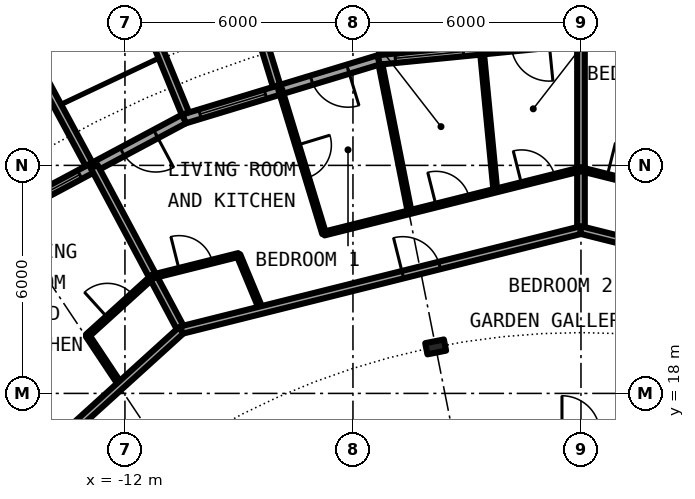
"""IFC4 building model, lengths in metres.
Left out: names, types, materials, properties, quantities, classifications, styles, units other than length and angle.
Written with IfcOpenShell. Run it as: python <this file> out.ifc"""

import sys

from ifc_helpers import new_model, si_unit, direction, frame, frame_2d, origin, origin_2d, place, context, subcontext, project, spatial, rectangle, i_section, extrude, element, fill, save


model = new_model("IFC4")
c1 = context("Model", 3, precision=1e-05, world=origin(), true_north=direction((0.0, 1.0)))
c2 = subcontext(c1, "Body", "Model", "MODEL_VIEW")
j1 = project(units=[si_unit("LENGTHUNIT", "METRE"), si_unit("PLANEANGLEUNIT", "RADIAN")], contexts=[c1])
p1 = place(None, origin())
s1 = spatial("IfcSite", under=j1, at=p1, CompositionType="ELEMENT")
p2 = place(p1, origin())
s2 = spatial("IfcBuilding", under=s1, at=p2, CompositionType="ELEMENT")
p3 = place(p2, frame((0.0, 0.0, 154.35)))
s3 = spatial("IfcBuildingStorey", under=s2, at=p3, CompositionType="ELEMENT", Elevation=154.35)
p4 = place(p3, frame((-3.824, 19.223, 0.0), z_axis=(0.0, 0.0, 1.0), x_axis=(-0.195090322016, 0.980785280403, 0.0)))
e1 = element("IfcColumn", 1, at=p4, inside=s3, PredefinedType="COLUMN", context=c2, shape_type="SweptSolid", body=[
    extrude(i_section(OverallWidth=0.3, OverallDepth=0.5, WebThickness=0.014, FlangeThickness=0.028, FilletRadius=0.027, at=origin_2d()), origin(), (0.0, 0.0, 1.0), 3.05),
])
p5 = place(p3, frame((5.326, 26.775, 0.0), z_axis=(0.0, 0.0, 1.0), x_axis=(-0.995173996315, 0.098126026407, 0.0)))
e2 = element("IfcWall", 2, at=p5, inside=s3, PredefinedType="SOLIDWALL", context=c2, shape_type="SweptSolid", body=[
    extrude(rectangle(XDim=5.352, YDim=0.25, at=frame_2d((2.676, 0.0))), origin(), (0.0, 0.0, 1.0), 2.7),
])
p6 = place(p5, frame((0.841, 0.0, 0.0)))
e3 = element("IfcOpeningElement", 3, at=p6, cuts=e2, PredefinedType="OPENING", context=c2, shape_type="SweptSolid", body=[
    extrude(rectangle(XDim=1.0, YDim=2.2, at=frame_2d((0.5, 1.1))), frame((0.0, 0.135, 0.0), z_axis=(0.0, -1.0, 0.0), x_axis=(1.0, 0.0, 0.0)), (0.0, 0.0, 1.0), 0.27),
])
p7 = place(p5, frame((3.111, 0.0, 0.3)))
e4 = element("IfcOpeningElement", 4, at=p7, cuts=e2, PredefinedType="OPENING", context=c2, shape_type="SweptSolid", body=[
    extrude(rectangle(XDim=1.8, YDim=2.1, at=frame_2d((0.9, 1.05))), frame((0.0, 0.135, 0.0), z_axis=(0.0, -1.0, 0.0), x_axis=(1.0, 0.0, 0.0)), (0.0, 0.0, 1.0), 0.27),
])
p8 = place(p3, frame((0.0, 27.3, 0.0), z_axis=(0.0, 0.0, 1.0), x_axis=(-0.995173996315, -0.098126026407, 0.0)))
e5 = element("IfcWall", 5, at=p8, inside=s3, PredefinedType="SOLIDWALL", context=c2, shape_type="SweptSolid", body=[
    extrude(rectangle(XDim=5.352, YDim=0.25, at=frame_2d((2.676, 0.0))), origin(), (0.0, 0.0, 1.0), 2.7),
])
p9 = place(p8, frame((0.841, 0.0, 0.0)))
e6 = element("IfcOpeningElement", 6, at=p9, cuts=e5, PredefinedType="OPENING", context=c2, shape_type="SweptSolid", body=[
    extrude(rectangle(XDim=1.0, YDim=2.2, at=frame_2d((0.5, 1.1))), frame((0.0, 0.135, 0.0), z_axis=(0.0, -1.0, 0.0), x_axis=(1.0, 0.0, 0.0)), (0.0, 0.0, 1.0), 0.27),
])
p10 = place(p8, frame((3.111, 0.0, 0.3)))
e7 = element("IfcOpeningElement", 7, at=p10, cuts=e5, PredefinedType="OPENING", context=c2, shape_type="SweptSolid", body=[
    extrude(rectangle(XDim=1.8, YDim=2.1, at=frame_2d((0.9, 1.05))), frame((0.0, 0.135, 0.0), z_axis=(0.0, -1.0, 0.0), x_axis=(1.0, 0.0, 0.0)), (0.0, 0.0, 1.0), 0.27),
])
p11 = place(p3, frame((-4.769, 26.956, -0.03), z_axis=(0.0, 0.0, 1.0), x_axis=(-0.174056778901, 0.984735618183, 0.0)))
e8 = element("IfcWall", 8, at=p11, inside=s3, PredefinedType="SOLIDWALL", context=c2, shape_type="SweptSolid", body=[
    extrude(rectangle(XDim=2.925, YDim=0.2, at=frame_2d((1.462, 0.0))), origin(), (0.0, 0.0, 1.0), 2.73),
])
p12 = place(p3, frame((-5.326, 26.775, 0.0), z_axis=(0.0, 0.0, 1.0), x_axis=(-0.956965678721, -0.290201119486, 0.0)))
e9 = element("IfcWall", 9, at=p12, inside=s3, PredefinedType="SOLIDWALL", context=c2, shape_type="SweptSolid", body=[
    extrude(rectangle(XDim=5.351, YDim=0.25, at=frame_2d((2.676, 0.0))), origin(), (0.0, 0.0, 1.0), 2.7),
])
p13 = place(p12, frame((0.841, 0.0, 0.0)))
e10 = element("IfcOpeningElement", 10, at=p13, cuts=e9, PredefinedType="OPENING", context=c2, shape_type="SweptSolid", body=[
    extrude(rectangle(XDim=1.0, YDim=2.2, at=frame_2d((0.5, 1.1))), frame((0.0, 0.135, 0.0), z_axis=(0.0, -1.0, 0.0), x_axis=(1.0, 0.0, 0.0)), (0.0, 0.0, 1.0), 0.27),
])
p14 = place(p12, frame((3.111, 0.0, 0.3)))
e11 = element("IfcOpeningElement", 11, at=p14, cuts=e9, PredefinedType="OPENING", context=c2, shape_type="SweptSolid", body=[
    extrude(rectangle(XDim=1.8, YDim=2.1, at=frame_2d((0.9, 1.05))), frame((0.0, 0.135, 0.0), z_axis=(0.0, -1.0, 0.0), x_axis=(1.0, 0.0, 0.0)), (0.0, 0.0, 1.0), 0.27),
])
p15 = place(p3, frame((-8.009, 26.092, -0.03), z_axis=(0.0, 0.0, 1.0), x_axis=(-0.293406695073, 0.955987715029, 0.0)))
e12 = element("IfcWall", 12, at=p15, inside=s3, PredefinedType="SOLIDWALL", context=c2, shape_type="SweptSolid", body=[
    extrude(rectangle(XDim=3.006, YDim=0.2, at=frame_2d((1.503, 0.0))), origin(), (0.0, 0.0, 1.0), 2.73),
])
p16 = place(p3, frame((-10.409, 25.364, -0.03), z_axis=(0.0, 0.0, 1.0), x_axis=(-0.379509886562, 0.925187681501, 0.0)))
e13 = element("IfcWall", 13, at=p16, inside=s3, PredefinedType="SOLIDWALL", context=c2, shape_type="SweptSolid", body=[
    extrude(rectangle(XDim=2.883, YDim=0.2, at=frame_2d((1.441, 0.0))), origin(), (0.0, 0.0, 1.0), 2.73),
])
p17 = place(p3, frame((-10.447, 25.222, 0.0), z_axis=(0.0, 0.0, 1.0), x_axis=(-0.881915646801, -0.471407246368, 0.0)))
e14 = element("IfcWall", 14, at=p17, inside=s3, PredefinedType="SOLIDWALL", context=c2, shape_type="SweptSolid", body=[
    extrude(rectangle(XDim=5.352, YDim=0.25, at=frame_2d((2.676, 0.0))), origin(), (0.0, 0.0, 1.0), 2.7),
])
p18 = place(p17, frame((0.841, 0.0, 0.0)))
e15 = element("IfcOpeningElement", 15, at=p18, cuts=e14, PredefinedType="OPENING", context=c2, shape_type="SweptSolid", body=[
    extrude(rectangle(XDim=1.0, YDim=2.2, at=frame_2d((0.5, 1.1))), frame((0.0, 0.135, 0.0), z_axis=(0.0, -1.0, 0.0), x_axis=(1.0, 0.0, 0.0)), (0.0, 0.0, 1.0), 0.27),
])
p19 = place(p17, frame((3.111, 0.0, 0.3)))
e16 = element("IfcOpeningElement", 16, at=p19, cuts=e14, PredefinedType="OPENING", context=c2, shape_type="SweptSolid", body=[
    extrude(rectangle(XDim=1.8, YDim=2.1, at=frame_2d((0.9, 1.05))), frame((0.0, 0.135, 0.0), z_axis=(0.0, -1.0, 0.0), x_axis=(1.0, 0.0, 0.0)), (0.0, 0.0, 1.0), 0.27),
])
p20 = place(p3, frame((-12.945, 24.029, -0.03), z_axis=(0.0, 0.0, 1.0), x_axis=(-0.474424310775, 0.88029629861, 0.0)))
e17 = element("IfcWall", 17, at=p20, inside=s3, PredefinedType="SOLIDWALL", context=c2, shape_type="SweptSolid", body=[
    extrude(rectangle(XDim=3.006, YDim=0.2, at=frame_2d((1.503, 0.0))), origin(), (0.0, 0.0, 1.0), 2.73),
])
p21 = place(p3, frame((-12.984, 19.521, 0.0), z_axis=(0.0, 0.0, 1.0), x_axis=(0.55373148684, -0.832695286694, 0.0)))
e18 = element("IfcWall", 18, at=p21, inside=s3, PredefinedType="PARTITIONING", context=c2, shape_type="SweptSolid", body=[
    extrude(rectangle(XDim=1.571, YDim=0.1, at=frame_2d((0.786, 0.0))), origin(), (0.0, 0.0, 1.0), 2.7),
])
p22 = place(p3, frame((-9.013, 21.642, 0.0), z_axis=(0.0, 0.0, 1.0), x_axis=(0.384228756538, -0.923237923099, 0.0)))
e19 = element("IfcWall", 19, at=p22, inside=s3, PredefinedType="PARTITIONING", context=c2, shape_type="SweptSolid", body=[
    extrude(rectangle(XDim=1.569, YDim=0.1, at=frame_2d((0.785, 0.0))), origin(), (0.0, 0.0, 1.0), 2.7),
])
p23 = place(p3, frame((-12.809, 23.966, 0.0), z_axis=(0.0, 0.0, 1.0), x_axis=(0.471271812246, -0.881988026553, 0.0)))
e20 = element("IfcWall", 20, at=p23, inside=s3, PredefinedType="PARTITIONING", context=c2, shape_type="SweptSolid", body=[
    extrude(rectangle(XDim=4.874, YDim=0.2, at=frame_2d((2.437, 0.0))), origin(), (0.0, 0.0, 1.0), 2.7),
])
p24 = place(p3, frame((-7.914, 25.997, 0.0), z_axis=(0.0, 0.0, 1.0), x_axis=(0.291291575636, -0.956634317785, 0.0)))
e21 = element("IfcWall", 21, at=p24, inside=s3, PredefinedType="PARTITIONING", context=c2, shape_type="SweptSolid", body=[
    extrude(rectangle(XDim=3.962, YDim=0.1, at=frame_2d((1.981, 0.0))), origin(), (0.0, 0.0, 1.0), 2.7),
])
p25 = place(p24, frame((1.531, 0.0, 0.0)))
e22 = element("IfcOpeningElement", 22, at=p25, cuts=e21, PredefinedType="OPENING", context=c2, shape_type="SweptSolid", body=[
    extrude(rectangle(XDim=0.9, YDim=2.3, at=frame_2d((0.45, 1.15))), frame((0.0, 0.06, 0.0), z_axis=(0.0, -1.0, 0.0), x_axis=(1.0, 0.0, 0.0)), (0.0, 0.0, 1.0), 0.12),
])
p26 = place(p3, frame((-5.276, 26.658, 0.0), z_axis=(0.0, 0.0, 1.0), x_axis=(0.194030211642, -0.980995554001, 0.0)))
e23 = element("IfcWall", 23, at=p26, inside=s3, PredefinedType="PARTITIONING", context=c2, shape_type="SweptSolid", body=[
    extrude(rectangle(XDim=3.962, YDim=0.1, at=frame_2d((1.981, 0.0))), origin(), (0.0, 0.0, 1.0), 2.7),
])
p27 = place(p3, frame((-2.612, 27.049, 0.0), z_axis=(0.0, 0.0, 1.0), x_axis=(0.09626981452, -0.995355274669, 0.0)))
e24 = element("IfcWall", 24, at=p27, inside=s3, PredefinedType="PARTITIONING", context=c2, shape_type="SweptSolid", body=[
    extrude(rectangle(XDim=3.73, YDim=0.1, at=frame_2d((1.865, 0.0))), origin(), (0.0, 0.0, 1.0), 2.7),
])
p28 = place(p3, frame((0.0, 22.3, 0.0), z_axis=(0.0, 0.0, 1.0), x_axis=(0.0, 1.0, 0.0)))
e25 = element("IfcWall", 25, at=p28, inside=s3, PredefinedType="PARTITIONING", context=c2, shape_type="SweptSolid", body=[
    extrude(rectangle(XDim=4.875, YDim=0.2, at=frame_2d((2.438, 0.0))), origin(), (0.0, 0.0, 1.0), 2.7),
])
p29 = place(p3, frame((-18.544, 12.385, 0.0), z_axis=(0.0, 0.0, 1.0), x_axis=(0.740849323054, 0.67167125927, 0.0)))
e26 = element("IfcWall", 26, at=p29, inside=s3, PredefinedType="PARTITIONING", context=c2, shape_type="SweptSolid", body=[
    extrude(rectangle(XDim=10.842, YDim=0.2, at=frame_2d((5.421, 0.0))), origin(), (0.0, 0.0, 1.0), 2.7),
])
p30 = place(p29, frame((3.839, 0.0, 0.0)))
e27 = element("IfcOpeningElement", 27, at=p30, cuts=e26, PredefinedType="OPENING", context=c2, shape_type="SweptSolid", body=[
    extrude(rectangle(XDim=1.0, YDim=2.3, at=frame_2d((0.5, 1.15))), frame((0.0, 0.11, 0.0), z_axis=(0.0, -1.0, 0.0), x_axis=(1.0, 0.0, 0.0)), (0.0, 0.0, 1.0), 0.22),
])
p31 = place(p3, frame((-10.512, 19.667, 0.0), z_axis=(0.0, 0.0, 1.0), x_axis=(0.970086843848, 0.242758141765, 0.0)))
e28 = element("IfcWall", 28, at=p31, inside=s3, PredefinedType="PARTITIONING", context=c2, shape_type="SweptSolid", body=[
    extrude(rectangle(XDim=10.842, YDim=0.2, at=frame_2d((5.421, 0.0))), origin(), (0.0, 0.0, 1.0), 2.7),
])
p32 = place(p31, frame((6.002, 0.0, 0.0)))
e29 = element("IfcOpeningElement", 29, at=p32, cuts=e28, PredefinedType="OPENING", context=c2, shape_type="SweptSolid", body=[
    extrude(rectangle(XDim=1.0, YDim=2.3, at=frame_2d((0.5, 1.15))), frame((0.0, 0.11, 0.0), z_axis=(0.0, -1.0, 0.0), x_axis=(1.0, 0.0, 0.0)), (0.0, 0.0, 1.0), 0.22),
])
p33 = place(p3, frame((-0.006, 22.299, 0.0), z_axis=(0.0, 0.0, 1.0), x_axis=(0.970086843848, -0.242758141765, 0.0)))
e30 = element("IfcWall", 30, at=p33, inside=s3, PredefinedType="PARTITIONING", context=c2, shape_type="SweptSolid", body=[
    extrude(rectangle(XDim=10.842, YDim=0.2, at=frame_2d((5.421, 0.0))), origin(), (0.0, 0.0, 1.0), 2.7),
])
p34 = place(p33, frame((3.841, 0.0, 0.0)))
e31 = element("IfcOpeningElement", 31, at=p34, cuts=e30, PredefinedType="OPENING", context=c2, shape_type="SweptSolid", body=[
    extrude(rectangle(XDim=1.0, YDim=2.3, at=frame_2d((0.5, 1.15))), frame((0.0, 0.11, 0.0), z_axis=(0.0, -1.0, 0.0), x_axis=(1.0, 0.0, 0.0)), (0.0, 0.0, 1.0), 0.22),
])
p35 = place(p3, frame((-12.993, 19.513, 0.0), z_axis=(0.0, 0.0, 1.0), x_axis=(0.74087097024, 0.671647381783, 0.0)))
e32 = element("IfcWall", 32, at=p35, inside=s3, PredefinedType="PARTITIONING", context=c2, shape_type="SweptSolid", body=[
    extrude(rectangle(XDim=2.324, YDim=0.1, at=frame_2d((1.162, 0.0))), origin(), (0.0, 0.0, 1.0), 2.7),
])
p36 = place(p35, frame((0.719, 0.0, 0.0)))
e33 = element("IfcOpeningElement", 33, at=p36, cuts=e32, PredefinedType="OPENING", context=c2, shape_type="SweptSolid", body=[
    extrude(rectangle(XDim=0.9, YDim=2.3, at=frame_2d((0.45, 1.15))), frame((0.0, 0.06, 0.0), z_axis=(0.0, -1.0, 0.0), x_axis=(1.0, 0.0, 0.0)), (0.0, 0.0, 1.0), 0.12),
])
p37 = place(p3, frame((-11.266, 21.078, 0.0), z_axis=(0.0, 0.0, 1.0), x_axis=(0.970074595874, 0.242807080706, 0.0)))
e34 = element("IfcWall", 34, at=p37, inside=s3, PredefinedType="PARTITIONING", context=c2, shape_type="SweptSolid", body=[
    extrude(rectangle(XDim=2.328, YDim=0.1, at=frame_2d((1.164, 0.0))), origin(), (0.0, 0.0, 1.0), 2.7),
])
p38 = place(p37, frame((0.714, 0.0, 0.0)))
e35 = element("IfcOpeningElement", 35, at=p38, cuts=e34, PredefinedType="OPENING", context=c2, shape_type="SweptSolid", body=[
    extrude(rectangle(XDim=0.9, YDim=2.3, at=frame_2d((0.45, 1.15))), frame((0.0, 0.06, 0.0), z_axis=(0.0, -1.0, 0.0), x_axis=(1.0, 0.0, 0.0)), (0.0, 0.0, 1.0), 0.12),
])
p39 = place(p3, frame((-6.76, 22.206, 0.0), z_axis=(0.0, 0.0, 1.0), x_axis=(0.970070358667, 0.242824008772, 0.0)))
e36 = element("IfcWall", 36, at=p39, inside=s3, PredefinedType="PARTITIONING", context=c2, shape_type="SweptSolid", body=[
    extrude(rectangle(XDim=6.972, YDim=0.1, at=frame_2d((3.486, 0.0))), origin(), (0.0, 0.0, 1.0), 2.7),
])
p40 = place(p39, frame((3.037, 0.0, 0.0)))
e37 = element("IfcOpeningElement", 37, at=p40, cuts=e36, PredefinedType="OPENING", context=c2, shape_type="SweptSolid", body=[
    extrude(rectangle(XDim=0.9, YDim=2.3, at=frame_2d((0.45, 1.15))), frame((0.0, 0.06, 0.0), z_axis=(0.0, -1.0, 0.0), x_axis=(1.0, 0.0, 0.0)), (0.0, 0.0, 1.0), 0.12),
])
p41 = place(p39, frame((5.357, 0.0, 0.0)))
e38 = element("IfcOpeningElement", 38, at=p41, cuts=e36, PredefinedType="OPENING", context=c2, shape_type="SweptSolid", body=[
    extrude(rectangle(XDim=0.9, YDim=2.3, at=frame_2d((0.45, 1.15))), frame((0.0, 0.06, 0.0), z_axis=(0.0, -1.0, 0.0), x_axis=(1.0, 0.0, 0.0)), (0.0, 0.0, 1.0), 0.12),
])
p42 = place(p3, frame((-0.003, 23.899, 0.0), z_axis=(0.0, 0.0, 1.0), x_axis=(0.970070358667, -0.242824008772, 0.0)))
e39 = element("IfcWall", 39, at=p42, inside=s3, PredefinedType="PARTITIONING", context=c2, shape_type="SweptSolid", body=[
    extrude(rectangle(XDim=6.972, YDim=0.1, at=frame_2d((3.486, 0.0))), origin(), (0.0, 0.0, 1.0), 2.7),
])
p43 = place(p42, frame((3.035, 0.0, 0.0)))
e40 = element("IfcOpeningElement", 40, at=p43, cuts=e39, PredefinedType="OPENING", context=c2, shape_type="SweptSolid", body=[
    extrude(rectangle(XDim=0.9, YDim=2.3, at=frame_2d((0.45, 1.15))), frame((0.0, 0.06, 0.0), z_axis=(0.0, -1.0, 0.0), x_axis=(1.0, 0.0, 0.0)), (0.0, 0.0, 1.0), 0.12),
])
p44 = place(p42, frame((0.715, 0.0, 0.0)))
e41 = element("IfcOpeningElement", 41, at=p44, cuts=e39, PredefinedType="OPENING", context=c2, shape_type="SweptSolid", body=[
    extrude(rectangle(XDim=0.9, YDim=2.3, at=frame_2d((0.45, 1.15))), frame((0.0, 0.06, 0.0), z_axis=(0.0, -1.0, 0.0), x_axis=(1.0, 0.0, 0.0)), (0.0, 0.0, 1.0), 0.12),
])
p45 = place(p10, origin())
e42 = element("IfcWindow", 42, at=p45, inside=s3, PartitioningType="SINGLE_PANEL", PredefinedType="WINDOW", context=c2, shape_type="SweptSolid", body=[
    extrude(rectangle(XDim=1.8, YDim=2.1, at=frame_2d((0.9, 1.05))), frame((0.0, 0.03, 0.0), z_axis=(0.0, -1.0, 0.0), x_axis=(1.0, 0.0, 0.0)), (0.0, 0.0, 1.0), 0.06),
])
fill(e7, e42)
p46 = place(p13, origin())
e43 = element("IfcDoor", 43, at=p46, inside=s3, OperationType="SINGLE_SWING_LEFT", PredefinedType="DOOR", context=c2, shape_type="SweptSolid", body=[
    extrude(rectangle(XDim=1.0, YDim=2.2, at=frame_2d((0.5, 1.1))), frame((0.0, 0.025, 0.0), z_axis=(0.0, -1.0, 0.0), x_axis=(1.0, 0.0, 0.0)), (0.0, 0.0, 1.0), 0.05),
])
fill(e10, e43)
p47 = place(p14, origin())
e44 = element("IfcWindow", 44, at=p47, inside=s3, PartitioningType="SINGLE_PANEL", PredefinedType="WINDOW", context=c2, shape_type="SweptSolid", body=[
    extrude(rectangle(XDim=1.8, YDim=2.1, at=frame_2d((0.9, 1.05))), frame((0.0, 0.03, 0.0), z_axis=(0.0, -1.0, 0.0), x_axis=(1.0, 0.0, 0.0)), (0.0, 0.0, 1.0), 0.06),
])
fill(e11, e44)
p48 = place(p18, origin())
e45 = element("IfcDoor", 45, at=p48, inside=s3, OperationType="SINGLE_SWING_LEFT", PredefinedType="DOOR", context=c2, shape_type="SweptSolid", body=[
    extrude(rectangle(XDim=1.0, YDim=2.2, at=frame_2d((0.5, 1.1))), frame((0.0, 0.025, 0.0), z_axis=(0.0, -1.0, 0.0), x_axis=(1.0, 0.0, 0.0)), (0.0, 0.0, 1.0), 0.05),
])
fill(e15, e45)
p49 = place(p19, origin())
e46 = element("IfcWindow", 46, at=p49, inside=s3, PartitioningType="SINGLE_PANEL", PredefinedType="WINDOW", context=c2, shape_type="SweptSolid", body=[
    extrude(rectangle(XDim=1.8, YDim=2.1, at=frame_2d((0.9, 1.05))), frame((0.0, 0.03, 0.0), z_axis=(0.0, -1.0, 0.0), x_axis=(1.0, 0.0, 0.0)), (0.0, 0.0, 1.0), 0.06),
])
fill(e16, e46)
p50 = place(p44, origin())
e47 = element("IfcDoor", 47, at=p50, inside=s3, OperationType="SINGLE_SWING_LEFT", PredefinedType="DOOR", context=c2, shape_type="SweptSolid", body=[
    extrude(rectangle(XDim=0.9, YDim=2.3, at=frame_2d((0.45, 1.15))), frame((0.0, 0.025, 0.0), z_axis=(0.0, -1.0, 0.0), x_axis=(1.0, 0.0, 0.0)), (0.0, 0.0, 1.0), 0.05),
])
fill(e41, e47)
p51 = place(p32, origin())
e48 = element("IfcDoor", 48, at=p51, inside=s3, OperationType="SINGLE_SWING_RIGHT", PredefinedType="DOOR", context=c2, shape_type="SweptSolid", body=[
    extrude(rectangle(XDim=1.0, YDim=2.3, at=frame_2d((0.5, 1.15))), frame((0.0, 0.025, 0.0), z_axis=(0.0, -1.0, 0.0), x_axis=(1.0, 0.0, 0.0)), (0.0, 0.0, 1.0), 0.05),
])
fill(e29, e48)
p52 = place(p38, origin())
e49 = element("IfcDoor", 49, at=p52, inside=s3, OperationType="SINGLE_SWING_RIGHT", PredefinedType="DOOR", context=c2, shape_type="SweptSolid", body=[
    extrude(rectangle(XDim=0.9, YDim=2.3, at=frame_2d((0.45, 1.15))), frame((0.0, 0.025, 0.0), z_axis=(0.0, -1.0, 0.0), x_axis=(1.0, 0.0, 0.0)), (0.0, 0.0, 1.0), 0.05),
])
fill(e35, e49)
p53 = place(p25, origin())
e50 = element("IfcDoor", 50, at=p53, inside=s3, OperationType="SINGLE_SWING_RIGHT", PredefinedType="DOOR", context=c2, shape_type="SweptSolid", body=[
    extrude(rectangle(XDim=0.9, YDim=2.3, at=frame_2d((0.45, 1.15))), frame((0.0, 0.025, 0.0), z_axis=(0.0, -1.0, 0.0), x_axis=(1.0, 0.0, 0.0)), (0.0, 0.0, 1.0), 0.05),
])
fill(e22, e50)
p54 = place(p40, origin())
e51 = element("IfcDoor", 51, at=p54, inside=s3, OperationType="SINGLE_SWING_RIGHT", PredefinedType="DOOR", context=c2, shape_type="SweptSolid", body=[
    extrude(rectangle(XDim=0.9, YDim=2.3, at=frame_2d((0.45, 1.15))), frame((0.0, 0.025, 0.0), z_axis=(0.0, -1.0, 0.0), x_axis=(1.0, 0.0, 0.0)), (0.0, 0.0, 1.0), 0.05),
])
fill(e37, e51)
p55 = place(p41, origin())
e52 = element("IfcDoor", 52, at=p55, inside=s3, OperationType="SINGLE_SWING_RIGHT", PredefinedType="DOOR", context=c2, shape_type="SweptSolid", body=[
    extrude(rectangle(XDim=0.9, YDim=2.3, at=frame_2d((0.45, 1.15))), frame((0.0, 0.025, 0.0), z_axis=(0.0, -1.0, 0.0), x_axis=(1.0, 0.0, 0.0)), (0.0, 0.0, 1.0), 0.05),
])
fill(e38, e52)
p56 = place(p36, origin())
e53 = element("IfcDoor", 53, at=p56, inside=s3, OperationType="SINGLE_SWING_RIGHT", PredefinedType="DOOR", context=c2, shape_type="SweptSolid", body=[
    extrude(rectangle(XDim=0.9, YDim=2.3, at=frame_2d((0.45, 1.15))), frame((0.0, 0.025, 0.0), z_axis=(0.0, -1.0, 0.0), x_axis=(1.0, 0.0, 0.0)), (0.0, 0.0, 1.0), 0.05),
])
fill(e33, e53)
save(model, sys.argv[1])
